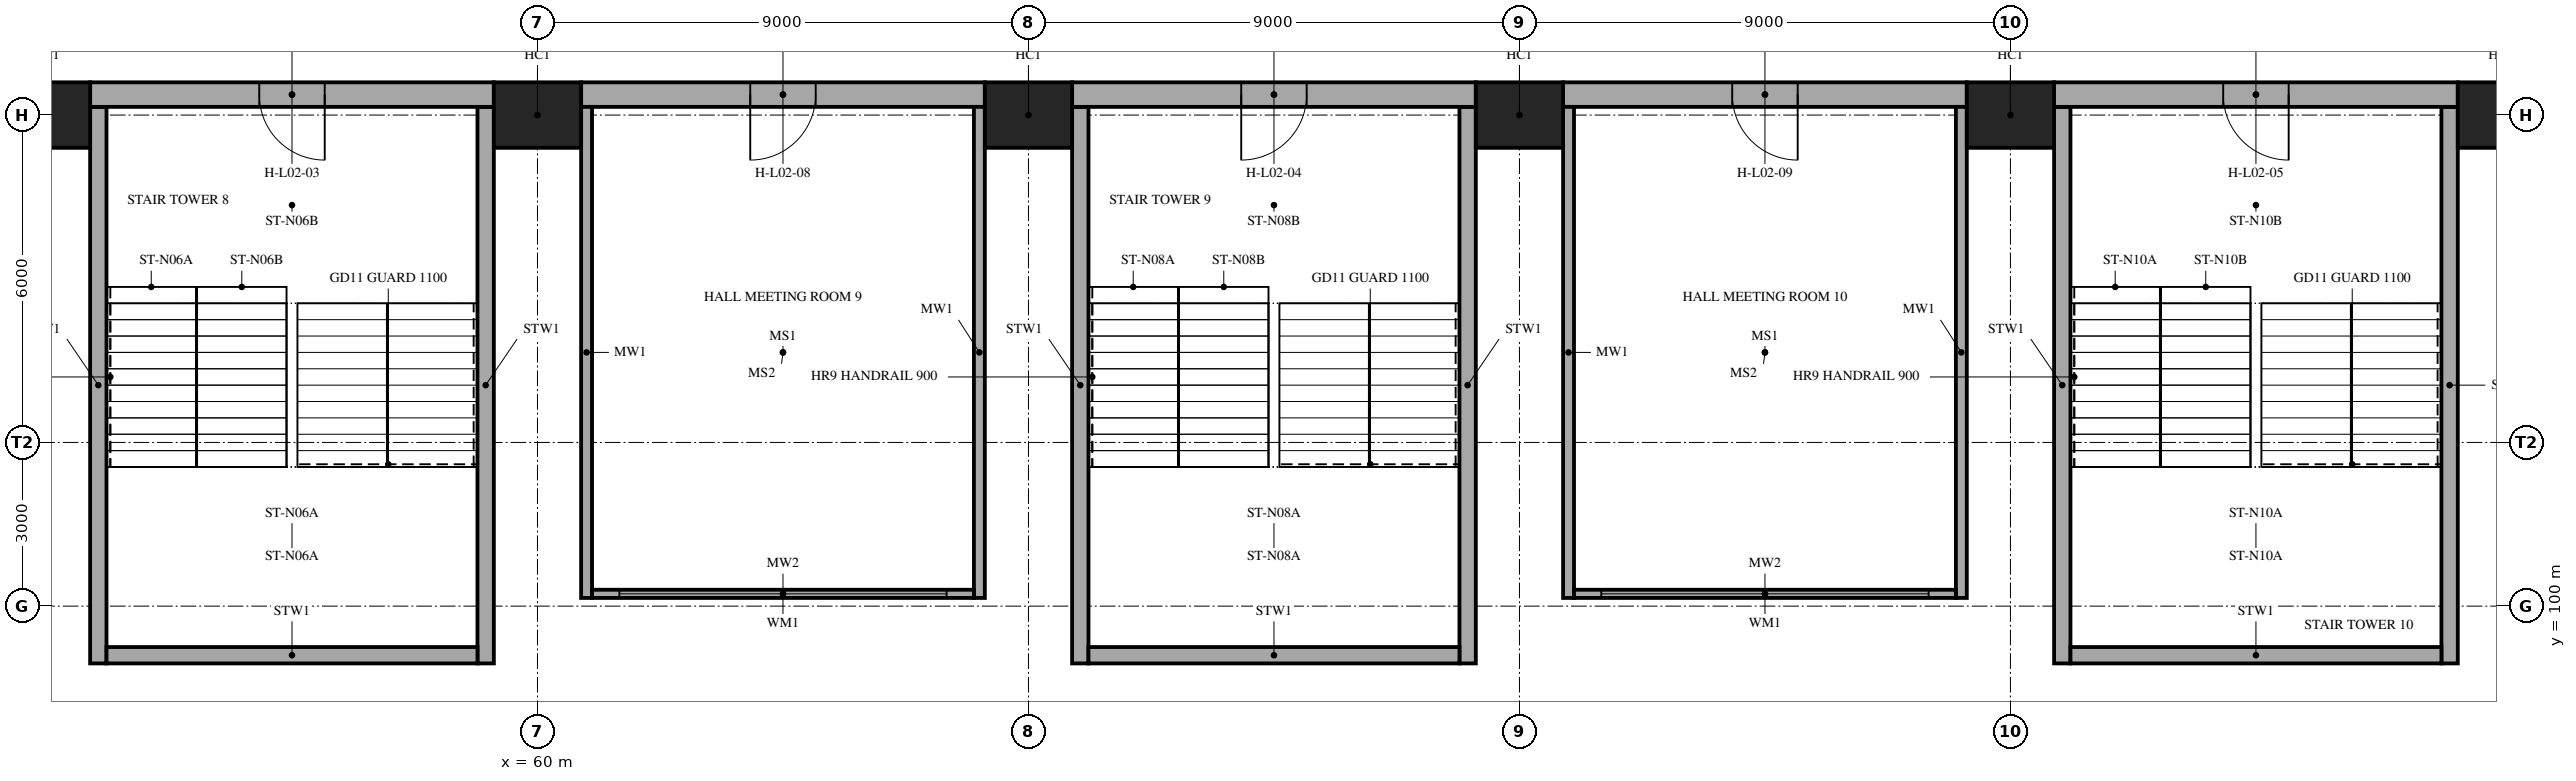
"""IFC4 building model, lengths in metres.
Left out: names, types, materials, properties, quantities, classifications, styles, units other than length and angle.
Written with IfcOpenShell. Run it as: python <this file> out.ifc"""

import sys

from ifc_helpers import new_model, si_unit, direction, frame, frame_2d, origin, origin_2d, place, context, subcontext, project, spatial, rectangle, extrude, element, fill, save


model = new_model("IFC4")
c1 = context("Model", 3, precision=1e-05, world=origin(), true_north=direction((0.0, 1.0)))
c2 = subcontext(c1, "Body", "Model", "MODEL_VIEW")
j1 = project(units=[si_unit("LENGTHUNIT", "METRE"), si_unit("PLANEANGLEUNIT", "RADIAN")], contexts=[c1])
p1 = place(None, origin())
s1 = spatial("IfcSite", under=j1, at=p1, CompositionType="ELEMENT")
p2 = place(p1, origin())
s2 = spatial("IfcBuilding", under=s1, at=p2, CompositionType="ELEMENT")
p3 = place(p2, frame((0.0, 0.0, 10.0)))
s3 = spatial("IfcBuildingStorey", under=s2, at=p3, CompositionType="ELEMENT", Elevation=10.0)
for number, where, z_axis, x_axis in (
    (1, (51.0, 109.0, 0.0), (0.0, 0.0, 1.0), (1.0, 0.0, 0.0)),
    (2, (60.0, 109.0, 0.0), (0.0, 0.0, 1.0), (1.0, 0.0, 0.0)),
    (3, (69.0, 109.0, 0.0), (0.0, 0.0, 1.0), (1.0, 0.0, 0.0)),
    (4, (78.0, 109.0, 0.0), (0.0, 0.0, 1.0), (1.0, 0.0, 0.0)),
    (5, (87.0, 109.0, 0.0), (0.0, 0.0, 1.0), (1.0, 0.0, 0.0)),
    (6, (96.0, 109.0, 0.0), (0.0, 0.0, 1.0), (1.0, 0.0, 0.0)),
):
    element("IfcColumn", number, at=place(p3, frame(where, z_axis=z_axis, x_axis=x_axis)), inside=s3, PredefinedType="COLUMN", context=c2, shape_type="SweptSolid", body=[
        extrude(rectangle(XDim=1.6, YDim=1.2, at=origin_2d()), origin(), (0.0, 0.0, 1.0), 5.0),
    ])
for number, where, z_axis, x_axis in (
    (7, (51.95, 109.15, 0.0), (0.0, 0.0, 1.0), (0.0, -1.0, 0.0)),
    (8, (59.05, 109.15, 0.0), (0.0, 0.0, 1.0), (0.0, -1.0, 0.0)),
):
    element("IfcWall", number, at=place(p3, frame(where, z_axis=z_axis, x_axis=x_axis)), inside=s3, PredefinedType="SHEAR", context=c2, shape_type="SweptSolid", body=[
        extrude(rectangle(XDim=10.2, YDim=0.3, at=frame_2d((5.1, 0.0))), origin(), (0.0, 0.0, 1.0), 5.0),
    ])
p4 = place(p3, frame((52.1, 99.1, 0.0), z_axis=(0.0, 0.0, 1.0), x_axis=(1.0, 0.0, 0.0)))
e9 = element("IfcWall", 9, at=p4, inside=s3, PredefinedType="SHEAR", context=c2, shape_type="SweptSolid", body=[
    extrude(rectangle(XDim=6.8, YDim=0.3, at=frame_2d((3.4, 0.0))), origin(), (0.0, 0.0, 1.0), 5.0),
])
for number, where, z_axis, x_axis in (
    (10, (69.95, 109.15, 0.0), (0.0, 0.0, 1.0), (0.0, -1.0, 0.0)),
    (11, (77.05, 109.15, 0.0), (0.0, 0.0, 1.0), (0.0, -1.0, 0.0)),
):
    element("IfcWall", number, at=place(p3, frame(where, z_axis=z_axis, x_axis=x_axis)), inside=s3, PredefinedType="SHEAR", context=c2, shape_type="SweptSolid", body=[
        extrude(rectangle(XDim=10.2, YDim=0.3, at=frame_2d((5.1, 0.0))), origin(), (0.0, 0.0, 1.0), 5.0),
    ])
p5 = place(p3, frame((70.1, 99.1, 0.0), z_axis=(0.0, 0.0, 1.0), x_axis=(1.0, 0.0, 0.0)))
e12 = element("IfcWall", 12, at=p5, inside=s3, PredefinedType="SHEAR", context=c2, shape_type="SweptSolid", body=[
    extrude(rectangle(XDim=6.8, YDim=0.3, at=frame_2d((3.4, 0.0))), origin(), (0.0, 0.0, 1.0), 5.0),
])
for number, where, z_axis, x_axis in (
    (13, (87.95, 109.15, 0.0), (0.0, 0.0, 1.0), (0.0, -1.0, 0.0)),
    (14, (95.05, 109.15, 0.0), (0.0, 0.0, 1.0), (0.0, -1.0, 0.0)),
):
    element("IfcWall", number, at=place(p3, frame(where, z_axis=z_axis, x_axis=x_axis)), inside=s3, PredefinedType="SHEAR", context=c2, shape_type="SweptSolid", body=[
        extrude(rectangle(XDim=10.2, YDim=0.3, at=frame_2d((5.1, 0.0))), origin(), (0.0, 0.0, 1.0), 5.0),
    ])
p6 = place(p3, frame((88.1, 99.1, 0.0), z_axis=(0.0, 0.0, 1.0), x_axis=(1.0, 0.0, 0.0)))
e15 = element("IfcWall", 15, at=p6, inside=s3, PredefinedType="SHEAR", context=c2, shape_type="SweptSolid", body=[
    extrude(rectangle(XDim=6.8, YDim=0.3, at=frame_2d((3.4, 0.0))), origin(), (0.0, 0.0, 1.0), 5.0),
])
p7 = place(p3, frame((51.8, 109.375, 0.0), z_axis=(0.0, 0.0, 1.0), x_axis=(1.0, 0.0, 0.0)))
e16 = element("IfcWall", 16, at=p7, inside=s3, PredefinedType="SOLIDWALL", context=c2, shape_type="SweptSolid", body=[
    extrude(rectangle(XDim=7.4, YDim=0.45, at=frame_2d((3.7, 0.0))), origin(), (0.0, 0.0, 1.0), 5.0),
])
p8 = place(p7, frame((3.1, 0.0, 0.0)))
e17 = element("IfcOpeningElement", 17, at=p8, cuts=e16, PredefinedType="OPENING", context=c2, shape_type="SweptSolid", body=[
    extrude(rectangle(XDim=1.2, YDim=2.1, at=frame_2d((0.6, 1.05))), frame((0.0, 0.235, 0.0), z_axis=(0.0, -1.0, 0.0), x_axis=(1.0, 0.0, 0.0)), (0.0, 0.0, 1.0), 0.47),
])
p9 = place(p3, frame((60.8, 109.375, 0.0), z_axis=(0.0, 0.0, 1.0), x_axis=(1.0, 0.0, 0.0)))
e18 = element("IfcWall", 18, at=p9, inside=s3, PredefinedType="SOLIDWALL", context=c2, shape_type="SweptSolid", body=[
    extrude(rectangle(XDim=7.4, YDim=0.45, at=frame_2d((3.7, 0.0))), origin(), (0.0, 0.0, 1.0), 5.0),
])
p10 = place(p9, frame((3.1, 0.0, 0.0)))
e19 = element("IfcOpeningElement", 19, at=p10, cuts=e18, PredefinedType="OPENING", context=c2, shape_type="SweptSolid", body=[
    extrude(rectangle(XDim=1.2, YDim=2.1, at=frame_2d((0.6, 1.05))), frame((0.0, 0.235, 0.0), z_axis=(0.0, -1.0, 0.0), x_axis=(1.0, 0.0, 0.0)), (0.0, 0.0, 1.0), 0.47),
])
p11 = place(p3, frame((69.8, 109.375, 0.0), z_axis=(0.0, 0.0, 1.0), x_axis=(1.0, 0.0, 0.0)))
e20 = element("IfcWall", 20, at=p11, inside=s3, PredefinedType="SOLIDWALL", context=c2, shape_type="SweptSolid", body=[
    extrude(rectangle(XDim=7.4, YDim=0.45, at=frame_2d((3.7, 0.0))), origin(), (0.0, 0.0, 1.0), 5.0),
])
p12 = place(p11, frame((3.1, 0.0, 0.0)))
e21 = element("IfcOpeningElement", 21, at=p12, cuts=e20, PredefinedType="OPENING", context=c2, shape_type="SweptSolid", body=[
    extrude(rectangle(XDim=1.2, YDim=2.1, at=frame_2d((0.6, 1.05))), frame((0.0, 0.235, 0.0), z_axis=(0.0, -1.0, 0.0), x_axis=(1.0, 0.0, 0.0)), (0.0, 0.0, 1.0), 0.47),
])
p13 = place(p3, frame((78.8, 109.375, 0.0), z_axis=(0.0, 0.0, 1.0), x_axis=(1.0, 0.0, 0.0)))
e22 = element("IfcWall", 22, at=p13, inside=s3, PredefinedType="SOLIDWALL", context=c2, shape_type="SweptSolid", body=[
    extrude(rectangle(XDim=7.4, YDim=0.45, at=frame_2d((3.7, 0.0))), origin(), (0.0, 0.0, 1.0), 5.0),
])
p14 = place(p13, frame((3.1, 0.0, 0.0)))
e23 = element("IfcOpeningElement", 23, at=p14, cuts=e22, PredefinedType="OPENING", context=c2, shape_type="SweptSolid", body=[
    extrude(rectangle(XDim=1.2, YDim=2.1, at=frame_2d((0.6, 1.05))), frame((0.0, 0.235, 0.0), z_axis=(0.0, -1.0, 0.0), x_axis=(1.0, 0.0, 0.0)), (0.0, 0.0, 1.0), 0.47),
])
p15 = place(p3, frame((87.8, 109.375, 0.0), z_axis=(0.0, 0.0, 1.0), x_axis=(1.0, 0.0, 0.0)))
e24 = element("IfcWall", 24, at=p15, inside=s3, PredefinedType="SOLIDWALL", context=c2, shape_type="SweptSolid", body=[
    extrude(rectangle(XDim=7.4, YDim=0.45, at=frame_2d((3.7, 0.0))), origin(), (0.0, 0.0, 1.0), 5.0),
])
p16 = place(p15, frame((3.1, 0.0, 0.0)))
e25 = element("IfcOpeningElement", 25, at=p16, cuts=e24, PredefinedType="OPENING", context=c2, shape_type="SweptSolid", body=[
    extrude(rectangle(XDim=1.2, YDim=2.1, at=frame_2d((0.6, 1.05))), frame((0.0, 0.235, 0.0), z_axis=(0.0, -1.0, 0.0), x_axis=(1.0, 0.0, 0.0)), (0.0, 0.0, 1.0), 0.47),
])
for number, where, z_axis, x_axis in (
    (26, (60.9, 100.15, 0.0), (0.0, 0.0, 1.0), (0.0, 1.0, 0.0)),
    (27, (68.1, 100.15, 0.0), (0.0, 0.0, 1.0), (0.0, 1.0, 0.0)),
):
    element("IfcWall", number, at=place(p3, frame(where, z_axis=z_axis, x_axis=x_axis)), inside=s3, PredefinedType="SHEAR", context=c2, shape_type="SweptSolid", body=[
        extrude(rectangle(XDim=9.0, YDim=0.2, at=frame_2d((4.5, 0.0))), origin(), (0.0, 0.0, 1.0), 4.25),
    ])
p17 = place(p3, frame((61.0, 100.225, 0.0), z_axis=(0.0, 0.0, 1.0), x_axis=(1.0, 0.0, 0.0)))
e28 = element("IfcWall", 28, at=p17, inside=s3, PredefinedType="PARTITIONING", context=c2, shape_type="SweptSolid", body=[
    extrude(rectangle(XDim=7.0, YDim=0.15, at=frame_2d((3.5, 0.0))), origin(), (0.0, 0.0, 1.0), 4.25),
])
p18 = place(p17, frame((0.5, 0.0, 0.9)))
e29 = element("IfcOpeningElement", 29, at=p18, cuts=e28, PredefinedType="OPENING", context=c2, shape_type="SweptSolid", body=[
    extrude(rectangle(XDim=6.0, YDim=2.7, at=frame_2d((3.0, 1.35))), frame((0.0, 0.085, 0.0), z_axis=(0.0, -1.0, 0.0), x_axis=(1.0, 0.0, 0.0)), (0.0, 0.0, 1.0), 0.17),
])
for number, where, z_axis, x_axis in (
    (30, (78.9, 100.15, 0.0), (0.0, 0.0, 1.0), (0.0, 1.0, 0.0)),
    (31, (86.1, 100.15, 0.0), (0.0, 0.0, 1.0), (0.0, 1.0, 0.0)),
):
    element("IfcWall", number, at=place(p3, frame(where, z_axis=z_axis, x_axis=x_axis)), inside=s3, PredefinedType="SHEAR", context=c2, shape_type="SweptSolid", body=[
        extrude(rectangle(XDim=9.0, YDim=0.2, at=frame_2d((4.5, 0.0))), origin(), (0.0, 0.0, 1.0), 4.25),
    ])
p19 = place(p3, frame((79.0, 100.225, 0.0), z_axis=(0.0, 0.0, 1.0), x_axis=(1.0, 0.0, 0.0)))
e32 = element("IfcWall", 32, at=p19, inside=s3, PredefinedType="PARTITIONING", context=c2, shape_type="SweptSolid", body=[
    extrude(rectangle(XDim=7.0, YDim=0.15, at=frame_2d((3.5, 0.0))), origin(), (0.0, 0.0, 1.0), 4.25),
])
p20 = place(p19, frame((0.5, 0.0, 0.9)))
e33 = element("IfcOpeningElement", 33, at=p20, cuts=e32, PredefinedType="OPENING", context=c2, shape_type="SweptSolid", body=[
    extrude(rectangle(XDim=6.0, YDim=2.7, at=frame_2d((3.0, 1.35))), frame((0.0, 0.085, 0.0), z_axis=(0.0, -1.0, 0.0), x_axis=(1.0, 0.0, 0.0)), (0.0, 0.0, 1.0), 0.17),
])
p21 = place(p8, frame((1.2, 0.0, 0.0), z_axis=(0.0, 0.0, 1.0), x_axis=(-1.0, 0.0, 0.0)))
e34 = element("IfcDoor", 34, at=p21, inside=s3, OperationType="SINGLE_SWING_LEFT", PredefinedType="DOOR", context=c2, shape_type="SweptSolid", body=[
    extrude(rectangle(XDim=1.2, YDim=2.1, at=frame_2d((0.6, 1.05))), frame((0.0, 0.025, 0.0), z_axis=(0.0, -1.0, 0.0), x_axis=(1.0, 0.0, 0.0)), (0.0, 0.0, 1.0), 0.05),
])
fill(e17, e34)
p22 = place(p12, frame((1.2, 0.0, 0.0), z_axis=(0.0, 0.0, 1.0), x_axis=(-1.0, 0.0, 0.0)))
e35 = element("IfcDoor", 35, at=p22, inside=s3, OperationType="SINGLE_SWING_RIGHT", PredefinedType="DOOR", context=c2, shape_type="SweptSolid", body=[
    extrude(rectangle(XDim=1.2, YDim=2.1, at=frame_2d((0.6, 1.05))), frame((0.0, 0.025, 0.0), z_axis=(0.0, -1.0, 0.0), x_axis=(1.0, 0.0, 0.0)), (0.0, 0.0, 1.0), 0.05),
])
fill(e21, e35)
p23 = place(p16, frame((1.2, 0.0, 0.0), z_axis=(0.0, 0.0, 1.0), x_axis=(-1.0, 0.0, 0.0)))
e36 = element("IfcDoor", 36, at=p23, inside=s3, OperationType="SINGLE_SWING_LEFT", PredefinedType="DOOR", context=c2, shape_type="SweptSolid", body=[
    extrude(rectangle(XDim=1.2, YDim=2.1, at=frame_2d((0.6, 1.05))), frame((0.0, 0.025, 0.0), z_axis=(0.0, -1.0, 0.0), x_axis=(1.0, 0.0, 0.0)), (0.0, 0.0, 1.0), 0.05),
])
fill(e25, e36)
p24 = place(p18, origin())
e37 = element("IfcWindow", 37, at=p24, inside=s3, PartitioningType="TRIPLE_PANEL_VERTICAL", PredefinedType="WINDOW", context=c2, shape_type="SweptSolid", body=[
    extrude(rectangle(XDim=6.0, YDim=2.7, at=frame_2d((3.0, 1.35))), frame((0.0, 0.03, 0.0), z_axis=(0.0, -1.0, 0.0), x_axis=(1.0, 0.0, 0.0)), (0.0, 0.0, 1.0), 0.06),
])
fill(e29, e37)
p25 = place(p10, frame((1.2, 0.0, 0.0), z_axis=(0.0, 0.0, 1.0), x_axis=(-1.0, 0.0, 0.0)))
e38 = element("IfcDoor", 38, at=p25, inside=s3, OperationType="SINGLE_SWING_RIGHT", PredefinedType="DOOR", context=c2, shape_type="SweptSolid", body=[
    extrude(rectangle(XDim=1.2, YDim=2.1, at=frame_2d((0.6, 1.05))), frame((0.0, 0.025, 0.0), z_axis=(0.0, -1.0, 0.0), x_axis=(1.0, 0.0, 0.0)), (0.0, 0.0, 1.0), 0.05),
])
fill(e19, e38)
p26 = place(p20, origin())
e39 = element("IfcWindow", 39, at=p26, inside=s3, PartitioningType="TRIPLE_PANEL_VERTICAL", PredefinedType="WINDOW", context=c2, shape_type="SweptSolid", body=[
    extrude(rectangle(XDim=6.0, YDim=2.7, at=frame_2d((3.0, 1.35))), frame((0.0, 0.03, 0.0), z_axis=(0.0, -1.0, 0.0), x_axis=(1.0, 0.0, 0.0)), (0.0, 0.0, 1.0), 0.06),
])
fill(e33, e39)
p27 = place(p14, frame((1.2, 0.0, 0.0), z_axis=(0.0, 0.0, 1.0), x_axis=(-1.0, 0.0, 0.0)))
e40 = element("IfcDoor", 40, at=p27, inside=s3, OperationType="SINGLE_SWING_LEFT", PredefinedType="DOOR", context=c2, shape_type="SweptSolid", body=[
    extrude(rectangle(XDim=1.2, YDim=2.1, at=frame_2d((0.6, 1.05))), frame((0.0, 0.025, 0.0), z_axis=(0.0, -1.0, 0.0), x_axis=(1.0, 0.0, 0.0)), (0.0, 0.0, 1.0), 0.05),
])
fill(e23, e40)
save(model, sys.argv[1])
